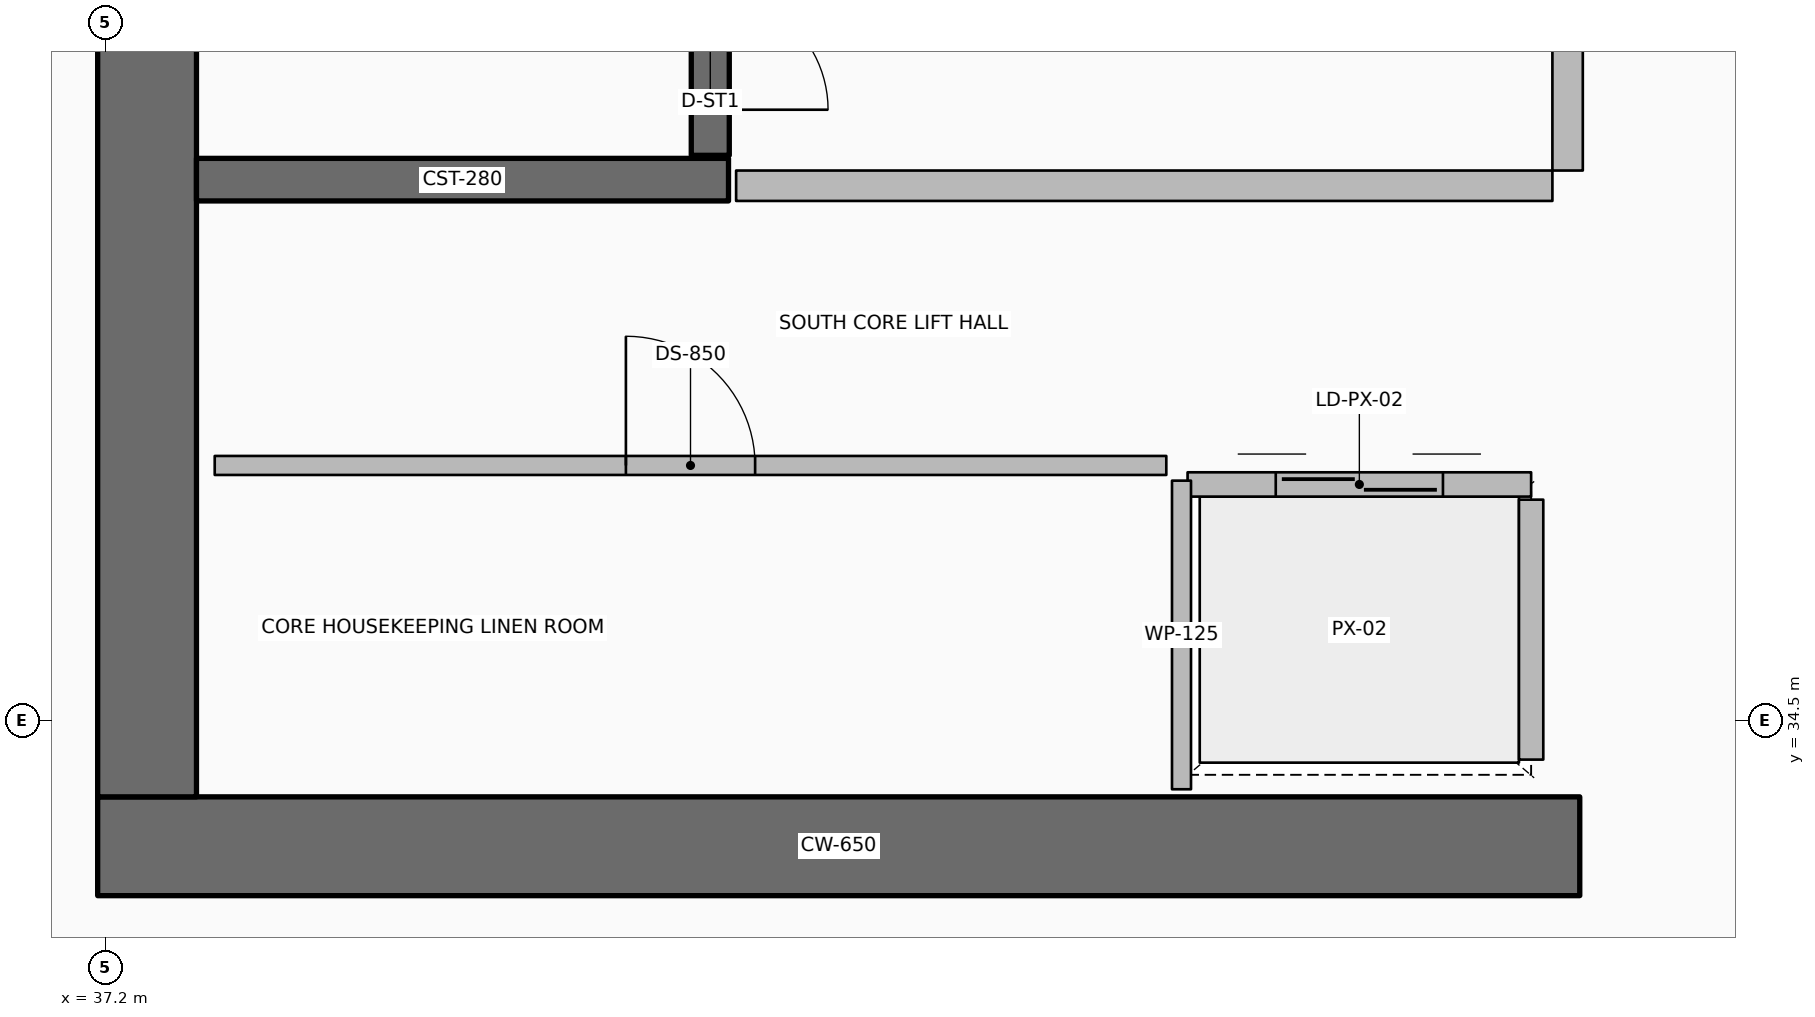
"""IFC4 building model, lengths in metres.
Left out: names, types, materials, properties, quantities, classifications, styles, units other than length and angle.
Written with IfcOpenShell. Run it as: python <this file> out.ifc"""

import sys

from ifc_helpers import new_model, si_unit, direction, frame, frame_2d, origin, place, context, subcontext, project, spatial, rectangle, extrude, element, fill, save


model = new_model("IFC4")
c1 = context("Model", 3, precision=1e-05, world=origin(), true_north=direction((0.0, 1.0)))
c2 = subcontext(c1, "Body", "Model", "MODEL_VIEW")
j1 = project(units=[si_unit("LENGTHUNIT", "METRE"), si_unit("PLANEANGLEUNIT", "RADIAN")], contexts=[c1])
p1 = place(None, origin())
s1 = spatial("IfcSite", under=j1, at=p1, CompositionType="ELEMENT")
p2 = place(p1, origin())
s2 = spatial("IfcBuilding", under=s1, at=p2, CompositionType="ELEMENT")
p3 = place(p2, frame((0.0, 0.0, 231.9)))
s3 = spatial("IfcBuildingStorey", under=s2, at=p3, CompositionType="ELEMENT", Elevation=231.9)
p4 = place(p3, frame((37.15, 33.675, 0.0), z_axis=(0.0, 0.0, 1.0), x_axis=(1.0, 0.0, 0.0)))
e1 = element("IfcWall", 1, at=p4, inside=s3, PredefinedType="SHEAR", context=c2, shape_type="SweptSolid", body=[
    extrude(rectangle(XDim=9.75, YDim=0.65, at=frame_2d((4.875, 0.0))), origin(), (0.0, 0.0, 1.0), 4.8),
])
p5 = place(p3, frame((37.475, 34.0, 0.0), z_axis=(0.0, 0.0, 1.0), x_axis=(0.0, 1.0, 0.0)))
e2 = element("IfcWall", 2, at=p5, inside=s3, PredefinedType="SHEAR", context=c2, shape_type="SweptSolid", body=[
    extrude(rectangle(XDim=16.0, YDim=0.65, at=frame_2d((8.0, 0.0))), origin(), (0.0, 0.0, 1.0), 4.8),
])
p6 = place(p3, frame((37.8, 38.06, 0.0), z_axis=(0.0, 0.0, 1.0), x_axis=(1.0, 0.0, 0.0)))
e3 = element("IfcWall", 3, at=p6, inside=s3, PredefinedType="SHEAR", context=c2, shape_type="SweptSolid", body=[
    extrude(rectangle(XDim=3.5, YDim=0.28, at=frame_2d((1.75, 0.0))), origin(), (0.0, 0.0, 1.0), 4.8),
])
p7 = place(p3, frame((41.18, 38.22, 0.0), z_axis=(0.0, 0.0, 1.0), x_axis=(0.0, 1.0, 0.0)))
e4 = element("IfcWall", 4, at=p7, inside=s3, PredefinedType="SOLIDWALL", context=c2, shape_type="SweptSolid", body=[
    extrude(rectangle(XDim=7.56, YDim=0.25, at=frame_2d((3.78, 0.0))), origin(), (0.0, 0.0, 1.0), 4.4),
])
p8 = place(p7, frame((0.3, 0.0, 0.0)))
e5 = element("IfcOpeningElement", 5, at=p8, cuts=e4, PredefinedType="OPENING", context=c2, shape_type="SweptSolid", body=[
    extrude(rectangle(XDim=1.55, YDim=2.15, at=frame_2d((0.775, 1.075))), frame((0.0, 0.135, 0.0), z_axis=(0.0, -1.0, 0.0), x_axis=(1.0, 0.0, 0.0)), (0.0, 0.0, 1.0), 0.27),
])
p9 = place(p3, frame((44.32, 36.055, 0.0), z_axis=(0.0, 0.0, 1.0), x_axis=(1.0, 0.0, 0.0)))
e6 = element("IfcWall", 6, at=p9, inside=s3, PredefinedType="PARTITIONING", context=c2, shape_type="SweptSolid", body=[
    extrude(rectangle(XDim=2.26, YDim=0.16, at=frame_2d((1.13, 0.0))), origin(), (0.0, 0.0, 1.0), 4.4),
])
p10 = place(p9, frame((0.58, 0.0, 0.0)))
e7 = element("IfcOpeningElement", 7, at=p10, cuts=e6, PredefinedType="OPENING", context=c2, shape_type="SweptSolid", body=[
    extrude(rectangle(XDim=1.1, YDim=2.1, at=frame_2d((0.55, 1.05))), frame((0.0, 0.09, 0.0), z_axis=(0.0, -1.0, 0.0), x_axis=(1.0, 0.0, 0.0)), (0.0, 0.0, 1.0), 0.18),
])
p11 = place(p3, frame((46.58, 34.245, 0.0), z_axis=(0.0, 0.0, 1.0), x_axis=(0.0, 1.0, 0.0)))
e8 = element("IfcWall", 8, at=p11, inside=s3, PredefinedType="PARTITIONING", context=c2, shape_type="SweptSolid", body=[
    extrude(rectangle(XDim=1.71, YDim=0.16, at=frame_2d((0.855, 0.0))), origin(), (0.0, 0.0, 1.0), 4.4),
])
p12 = place(p3, frame((44.28, 34.05, 0.0), z_axis=(0.0, 0.0, 1.0), x_axis=(0.0, 1.0, 0.0)))
e9 = element("IfcWall", 9, at=p12, inside=s3, PredefinedType="PARTITIONING", context=c2, shape_type="SweptSolid", body=[
    extrude(rectangle(XDim=2.03, YDim=0.125, at=frame_2d((1.015, 0.0))), origin(), (0.0, 0.0, 1.0), 3.84),
])
p13 = place(p3, frame((37.92, 36.18, 0.0), z_axis=(0.0, 0.0, 1.0), x_axis=(1.0, 0.0, 0.0)))
e10 = element("IfcWall", 10, at=p13, inside=s3, PredefinedType="PARTITIONING", context=c2, shape_type="SweptSolid", body=[
    extrude(rectangle(XDim=6.26, YDim=0.125, at=frame_2d((3.13, 0.0))), origin(), (0.0, 0.0, 1.0), 3.84),
])
p14 = place(p13, frame((2.705, 0.0, 0.0)))
e11 = element("IfcOpeningElement", 11, at=p14, cuts=e10, PredefinedType="OPENING", context=c2, shape_type="SweptSolid", body=[
    extrude(rectangle(XDim=0.85, YDim=2.06, at=frame_2d((0.425, 1.03))), frame((0.0, 0.073, 0.0), z_axis=(0.0, -1.0, 0.0), x_axis=(1.0, 0.0, 0.0)), (0.0, 0.0, 1.0), 0.145),
])
p15 = place(p3, frame((41.35, 38.02, 0.0), z_axis=(0.0, 0.0, 1.0), x_axis=(1.0, 0.0, 0.0)))
e12 = element("IfcWall", 12, at=p15, inside=s3, PredefinedType="PARTITIONING", context=c2, shape_type="SweptSolid", body=[
    extrude(rectangle(XDim=5.37, YDim=0.2, at=frame_2d((2.685, 0.0))), origin(), (0.0, 0.0, 1.0), 4.4),
])
p16 = place(p3, frame((46.82, 38.12, 0.0), z_axis=(0.0, 0.0, 1.0), x_axis=(0.0, 1.0, 0.0)))
e13 = element("IfcWall", 13, at=p16, inside=s3, PredefinedType="PARTITIONING", context=c2, shape_type="SweptSolid", body=[
    extrude(rectangle(XDim=3.26, YDim=0.2, at=frame_2d((1.63, 0.0))), origin(), (0.0, 0.0, 1.0), 4.4),
])
p17 = place(p16, frame((1.105, 0.0, 0.0)))
e14 = element("IfcOpeningElement", 14, at=p17, cuts=e13, PredefinedType="OPENING", context=c2, shape_type="SweptSolid", body=[
    extrude(rectangle(XDim=1.05, YDim=2.1, at=frame_2d((0.525, 1.05))), frame((0.0, 0.11, 0.0), z_axis=(0.0, -1.0, 0.0), x_axis=(1.0, 0.0, 0.0)), (0.0, 0.0, 1.0), 0.22),
])
p18 = place(p8, origin())
e15 = element("IfcDoor", 15, at=p18, inside=s3, OperationType="DOUBLE_DOOR_SINGLE_SWING", PredefinedType="DOOR", context=c2, shape_type="SweptSolid", body=[
    extrude(rectangle(XDim=1.55, YDim=2.15, at=frame_2d((0.775, 1.075))), frame((0.0, 0.025, 0.0), z_axis=(0.0, -1.0, 0.0), x_axis=(1.0, 0.0, 0.0)), (0.0, 0.0, 1.0), 0.05),
])
fill(e5, e15)
p19 = place(p10, origin())
e16 = element("IfcDoor", 16, at=p19, inside=s3, OperationType="DOUBLE_DOOR_SLIDING", PredefinedType="DOOR", context=c2, shape_type="SweptSolid", body=[
    extrude(rectangle(XDim=1.1, YDim=2.1, at=frame_2d((0.55, 1.05))), frame((0.0, 0.025, 0.0), z_axis=(0.0, -1.0, 0.0), x_axis=(1.0, 0.0, 0.0)), (0.0, 0.0, 1.0), 0.05),
])
fill(e7, e16)
p20 = place(p14, origin())
e17 = element("IfcDoor", 17, at=p20, inside=s3, OperationType="SINGLE_SWING_LEFT", PredefinedType="DOOR", context=c2, shape_type="SweptSolid", body=[
    extrude(rectangle(XDim=0.85, YDim=2.06, at=frame_2d((0.425, 1.03))), frame((0.0, 0.025, 0.0), z_axis=(0.0, -1.0, 0.0), x_axis=(1.0, 0.0, 0.0)), (0.0, 0.0, 1.0), 0.05),
])
fill(e11, e17)
save(model, sys.argv[1])
